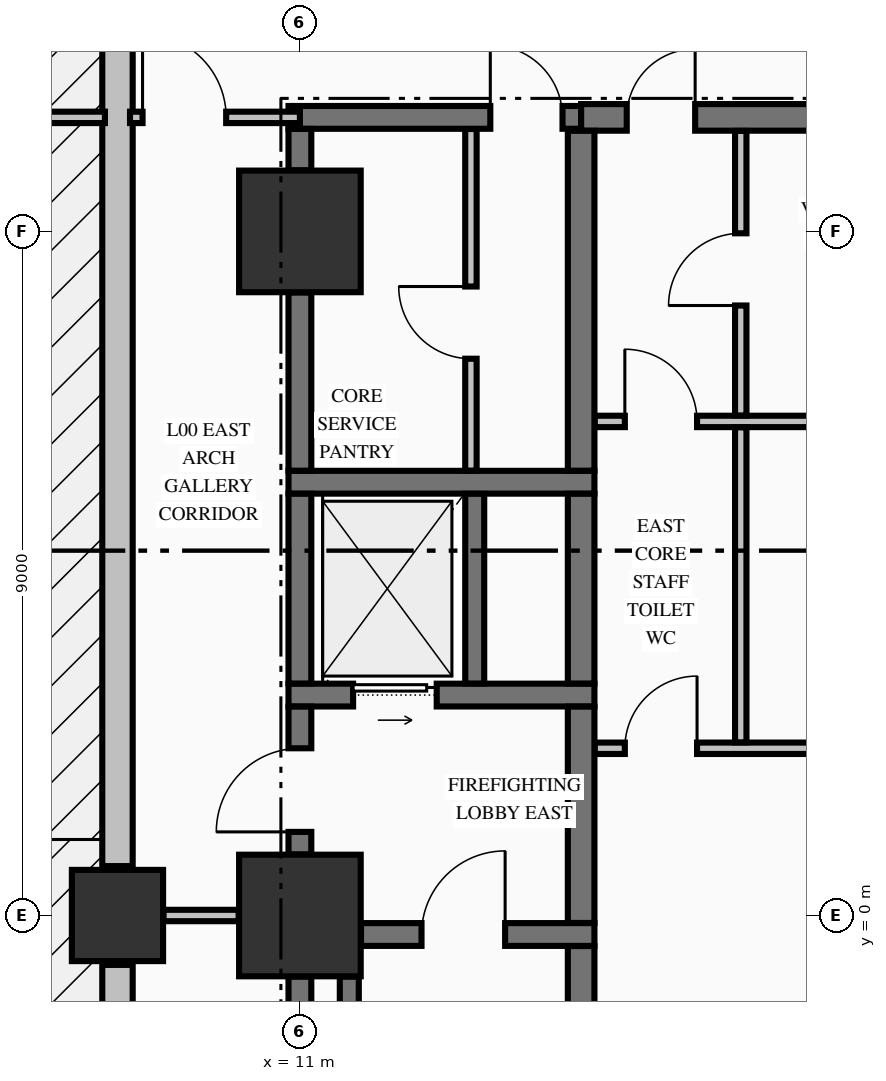
"""IFC4 building model, lengths in metres.
Left out: names, types, materials, properties, quantities, classifications, styles, units other than length and angle.
Written with IfcOpenShell. Run it as: python <this file> out.ifc"""

import sys

from ifc_helpers import new_model, si_unit, direction, frame, frame_2d, origin, origin_2d, place, context, subcontext, project, spatial, rectangle, extrude, element, fill, save


model = new_model("IFC4")
c1 = context("Model", 3, precision=1e-05, world=origin(), true_north=direction((0.0, 1.0)))
c2 = subcontext(c1, "Body", "Model", "MODEL_VIEW")
j1 = project(units=[si_unit("LENGTHUNIT", "METRE"), si_unit("PLANEANGLEUNIT", "RADIAN")], contexts=[c1])
p1 = place(None, origin())
s1 = spatial("IfcSite", under=j1, at=p1, CompositionType="ELEMENT")
p2 = place(p1, origin())
s2 = spatial("IfcBuilding", under=s1, at=p2, CompositionType="ELEMENT")
p3 = place(p2, origin())
s3 = spatial("IfcBuildingStorey", under=s2, at=p3, CompositionType="ELEMENT", Elevation=0.0)
for number, where, z_axis, x_axis in (
    (1, (11.0, 0.0, 0.0), (0.0, 0.0, 1.0), (1.0, 0.0, 0.0)),
    (2, (11.0, 9.0, 0.0), (0.0, 0.0, 1.0), (1.0, 0.0, 0.0)),
):
    element("IfcColumn", number, at=place(p3, frame(where, z_axis=z_axis, x_axis=x_axis)), inside=s3, PredefinedType="COLUMN", context=c2, shape_type="SweptSolid", body=[
        extrude(rectangle(XDim=1.6, YDim=1.6, at=origin_2d()), origin(), (0.0, 0.0, 1.0), 5.09),
    ])
p4 = place(p3, frame((8.6, 0.0, 0.0), z_axis=(0.0, 0.0, 1.0), x_axis=(1.0, 0.0, 0.0)))
e3 = element("IfcColumn", 3, at=p4, inside=s3, PredefinedType="COLUMN", context=c2, shape_type="SweptSolid", body=[
    extrude(rectangle(XDim=1.2, YDim=1.2, at=origin_2d()), origin(), (0.0, 0.0, 1.0), 5.09),
])
p5 = place(p3, frame((8.6, 15.35, 0.0), z_axis=(0.0, 0.0, 1.0), x_axis=(0.0, -1.0, 0.0)))
e4 = element("IfcWall", 4, at=p5, inside=s3, PredefinedType="STANDARD", context=c2, shape_type="SweptSolid", body=[
    extrude(rectangle(XDim=14.7, YDim=0.4, at=frame_2d((7.35, 0.0))), origin(), (0.0, 0.0, 1.0), 4.132),
])
p6 = place(p3, frame((8.6, -0.65, 0.0), z_axis=(0.0, 0.0, 1.0), x_axis=(0.0, -1.0, 0.0)))
e5 = element("IfcWall", 5, at=p6, inside=s3, PredefinedType="STANDARD", context=c2, shape_type="SweptSolid", body=[
    extrude(rectangle(XDim=24.7, YDim=0.4, at=frame_2d((12.35, 0.0))), origin(), (0.0, 0.0, 1.0), 4.132),
])
p7 = place(p6, frame((10.5, 0.0, 0.0)))
e6 = element("IfcOpeningElement", 6, at=p7, cuts=e5, PredefinedType="OPENING", context=c2, shape_type="SweptSolid", body=[
    extrude(rectangle(XDim=2.4, YDim=2.6, at=frame_2d((1.2, 1.3))), frame((0.0, 0.21, 0.0), z_axis=(0.0, -1.0, 0.0), x_axis=(1.0, 0.0, 0.0)), (0.0, 0.0, 1.0), 0.42),
])
p8 = place(p3, frame((11.804, -0.25, 0.0), z_axis=(0.0, 0.0, 1.0), x_axis=(1.0, 0.0, 0.0)))
e7 = element("IfcWall", 7, at=p8, inside=s3, PredefinedType="SHEAR", context=c2, shape_type="SweptSolid", body=[
    extrude(rectangle(XDim=3.071, YDim=0.3, at=frame_2d((1.536, 0.0))), origin(), (0.0, 0.0, 1.0), 5.09),
])
p9 = place(p8, frame((0.796, 0.0, 0.0)))
e8 = element("IfcOpeningElement", 8, at=p9, cuts=e7, PredefinedType="OPENING", context=c2, shape_type="SweptSolid", body=[
    extrude(rectangle(XDim=1.1, YDim=2.15, at=frame_2d((0.55, 1.075))), frame((0.0, 0.16, 0.0), z_axis=(0.0, -1.0, 0.0), x_axis=(1.0, 0.0, 0.0)), (0.0, 0.0, 1.0), 0.32),
])
p10 = place(p3, frame((10.85, 2.9, 0.0), z_axis=(0.0, 0.0, 1.0), x_axis=(1.0, 0.0, 0.0)))
e9 = element("IfcWall", 9, at=p10, inside=s3, PredefinedType="SHEAR", context=c2, shape_type="SweptSolid", body=[
    extrude(rectangle(XDim=4.025, YDim=0.3, at=frame_2d((2.012, 0.0))), origin(), (0.0, 0.0, 1.0), 5.09),
])
p11 = place(p10, frame((0.85, 0.0, 0.0)))
e10 = element("IfcOpeningElement", 10, at=p11, cuts=e9, PredefinedType="OPENING", context=c2, shape_type="SweptSolid", body=[
    extrude(rectangle(XDim=1.1, YDim=2.2, at=frame_2d((0.55, 1.1))), frame((0.0, 0.16, 0.0), z_axis=(0.0, -1.0, 0.0), x_axis=(1.0, 0.0, 0.0)), (0.0, 0.0, 1.0), 0.32),
])
p12 = place(p3, frame((10.85, 5.7, 0.0), z_axis=(0.0, 0.0, 1.0), x_axis=(1.0, 0.0, 0.0)))
e11 = element("IfcWall", 11, at=p12, inside=s3, PredefinedType="SHEAR", context=c2, shape_type="SweptSolid", body=[
    extrude(rectangle(XDim=4.025, YDim=0.3, at=frame_2d((2.012, 0.0))), origin(), (0.0, 0.0, 1.0), 5.09),
])
p13 = place(p3, frame((10.85, 10.5, 0.0), z_axis=(0.0, 0.0, 1.0), x_axis=(1.0, 0.0, 0.0)))
e12 = element("IfcWall", 12, at=p13, inside=s3, PredefinedType="SHEAR", context=c2, shape_type="SweptSolid", body=[
    extrude(rectangle(XDim=3.85, YDim=0.3, at=frame_2d((1.925, 0.0))), origin(), (0.0, 0.0, 1.0), 5.09),
])
p14 = place(p13, frame((2.655, 0.0, 0.0)))
e13 = element("IfcOpeningElement", 13, at=p14, cuts=e12, PredefinedType="OPENING", context=c2, shape_type="SweptSolid", body=[
    extrude(rectangle(XDim=0.95, YDim=2.15, at=frame_2d((0.475, 1.075))), frame((0.0, 0.16, 0.0), z_axis=(0.0, -1.0, 0.0), x_axis=(1.0, 0.0, 0.0)), (0.0, 0.0, 1.0), 0.32),
])
p15 = place(p3, frame((14.7, 10.5, 0.0), z_axis=(0.0, 0.0, 1.0), x_axis=(1.0, 0.0, 0.0)))
e14 = element("IfcWall", 14, at=p15, inside=s3, PredefinedType="SHEAR", context=c2, shape_type="SweptSolid", body=[
    extrude(rectangle(XDim=5.475, YDim=0.35, at=frame_2d((2.738, 0.0))), origin(), (0.0, 0.0, 1.0), 5.09),
])
p16 = place(p15, frame((0.6, 0.0, 0.0)))
e15 = element("IfcOpeningElement", 15, at=p16, cuts=e14, PredefinedType="OPENING", context=c2, shape_type="SweptSolid", body=[
    extrude(rectangle(XDim=0.9, YDim=2.15, at=frame_2d((0.45, 1.075))), frame((0.0, 0.185, 0.0), z_axis=(0.0, -1.0, 0.0), x_axis=(1.0, 0.0, 0.0)), (0.0, 0.0, 1.0), 0.37),
])
p17 = place(p3, frame((9.206, 0.0, 0.0), z_axis=(0.0, 0.0, 1.0), x_axis=(1.0, 0.0, 0.0)))
e16 = element("IfcWall", 16, at=p17, inside=s3, PredefinedType="PARTITIONING", context=c2, shape_type="SweptSolid", body=[
    extrude(rectangle(XDim=0.988, YDim=0.15, at=frame_2d((0.494, 0.0))), origin(), (0.0, 0.0, 1.0), 4.132),
])
p18 = place(p3, frame((14.878, 2.2, 0.0), z_axis=(0.0, 0.0, 1.0), x_axis=(1.0, 0.0, 0.0)))
e17 = element("IfcWall", 17, at=p18, inside=s3, PredefinedType="PARTITIONING", context=c2, shape_type="SweptSolid", body=[
    extrude(rectangle(XDim=4.944, YDim=0.15, at=frame_2d((2.472, 0.0))), origin(), (0.0, 0.0, 1.0), 5.09),
])
p19 = place(p18, frame((0.397, 0.0, 0.0)))
e18 = element("IfcOpeningElement", 18, at=p19, cuts=e17, PredefinedType="OPENING", context=c2, shape_type="SweptSolid", body=[
    extrude(rectangle(XDim=0.95, YDim=2.15, at=frame_2d((0.475, 1.075))), frame((0.0, 0.085, 0.0), z_axis=(0.0, -1.0, 0.0), x_axis=(1.0, 0.0, 0.0)), (0.0, 0.0, 1.0), 0.17),
])
p20 = place(p3, frame((14.878, 6.5, 0.0), z_axis=(0.0, 0.0, 1.0), x_axis=(1.0, 0.0, 0.0)))
e19 = element("IfcWall", 19, at=p20, inside=s3, PredefinedType="PARTITIONING", context=c2, shape_type="SweptSolid", body=[
    extrude(rectangle(XDim=4.944, YDim=0.15, at=frame_2d((2.472, 0.0))), origin(), (0.0, 0.0, 1.0), 5.09),
])
p21 = place(p20, frame((0.397, 0.0, 0.0)))
e20 = element("IfcOpeningElement", 20, at=p21, cuts=e19, PredefinedType="OPENING", context=c2, shape_type="SweptSolid", body=[
    extrude(rectangle(XDim=0.95, YDim=2.15, at=frame_2d((0.475, 1.075))), frame((0.0, 0.085, 0.0), z_axis=(0.0, -1.0, 0.0), x_axis=(1.0, 0.0, 0.0)), (0.0, 0.0, 1.0), 0.17),
])
p22 = place(p20, frame((3.047, 0.0, 0.0)))
e21 = element("IfcOpeningElement", 21, at=p22, cuts=e19, PredefinedType="OPENING", context=c2, shape_type="SweptSolid", body=[
    extrude(rectangle(XDim=0.95, YDim=2.15, at=frame_2d((0.475, 1.075))), frame((0.0, 0.085, 0.0), z_axis=(0.0, -1.0, 0.0), x_axis=(1.0, 0.0, 0.0)), (0.0, 0.0, 1.0), 0.17),
])
p23 = place(p3, frame((-8.435, 10.5, 0.0), z_axis=(0.0, 0.0, 1.0), x_axis=(1.0, 0.0, 0.0)))
e22 = element("IfcWall", 22, at=p23, inside=s3, PredefinedType="PARTITIONING", context=c2, shape_type="SweptSolid", body=[
    extrude(rectangle(XDim=16.87, YDim=0.15, at=frame_2d((8.435, 0.0))), origin(), (0.0, 0.0, 1.0), 5.09),
])
p24 = place(p23, frame((7.735, 0.0, 0.0)))
e23 = element("IfcOpeningElement", 23, at=p24, cuts=e22, PredefinedType="OPENING", context=c2, shape_type="SweptSolid", body=[
    extrude(rectangle(XDim=1.4, YDim=2.2, at=frame_2d((0.7, 1.1))), frame((0.0, 0.085, 0.0), z_axis=(0.0, -1.0, 0.0), x_axis=(1.0, 0.0, 0.0)), (0.0, 0.0, 1.0), 0.17),
])
p25 = place(p3, frame((8.765, 10.5, 0.0), z_axis=(0.0, 0.0, 1.0), x_axis=(1.0, 0.0, 0.0)))
e24 = element("IfcWall", 24, at=p25, inside=s3, PredefinedType="PARTITIONING", context=c2, shape_type="SweptSolid", body=[
    extrude(rectangle(XDim=2.235, YDim=0.15, at=frame_2d((1.118, 0.0))), origin(), (0.0, 0.0, 1.0), 5.09),
])
p26 = place(p25, frame((0.165, 0.0, 0.0)))
e25 = element("IfcOpeningElement", 25, at=p26, cuts=e24, PredefinedType="OPENING", context=c2, shape_type="SweptSolid", body=[
    extrude(rectangle(XDim=1.1, YDim=2.15, at=frame_2d((0.55, 1.075))), frame((0.0, 0.085, 0.0), z_axis=(0.0, -1.0, 0.0), x_axis=(1.0, 0.0, 0.0)), (0.0, 0.0, 1.0), 0.17),
])
p27 = place(p3, frame((11.0, -8.196, 0.0), z_axis=(0.0, 0.0, 1.0), x_axis=(0.0, 1.0, 0.0)))
e26 = element("IfcWall", 26, at=p27, inside=s3, PredefinedType="SHEAR", context=c2, shape_type="SweptSolid", body=[
    extrude(rectangle(XDim=7.392, YDim=0.3, at=frame_2d((3.696, 0.0))), origin(), (0.0, 0.0, 1.0), 5.09),
])
p28 = place(p3, frame((11.0, 0.804, 0.0), z_axis=(0.0, 0.0, 1.0), x_axis=(0.0, 1.0, 0.0)))
e27 = element("IfcWall", 27, at=p28, inside=s3, PredefinedType="SHEAR", context=c2, shape_type="SweptSolid", body=[
    extrude(rectangle(XDim=1.944, YDim=0.3, at=frame_2d((0.972, 0.0))), origin(), (0.0, 0.0, 1.0), 5.09),
])
p29 = place(p28, frame((0.296, 0.0, 0.0)))
e28 = element("IfcOpeningElement", 28, at=p29, cuts=e27, PredefinedType="OPENING", context=c2, shape_type="SweptSolid", body=[
    extrude(rectangle(XDim=1.1, YDim=2.15, at=frame_2d((0.55, 1.075))), frame((0.0, 0.16, 0.0), z_axis=(0.0, -1.0, 0.0), x_axis=(1.0, 0.0, 0.0)), (0.0, 0.0, 1.0), 0.32),
])
p30 = place(p3, frame((11.0, 3.052, 0.0), z_axis=(0.0, 0.0, 1.0), x_axis=(0.0, 1.0, 0.0)))
e29 = element("IfcWall", 29, at=p30, inside=s3, PredefinedType="SHEAR", context=c2, shape_type="SweptSolid", body=[
    extrude(rectangle(XDim=2.496, YDim=0.3, at=frame_2d((1.248, 0.0))), origin(), (0.0, 0.0, 1.0), 5.09),
])
p31 = place(p3, frame((11.0, 5.852, 0.0), z_axis=(0.0, 0.0, 1.0), x_axis=(0.0, 1.0, 0.0)))
e30 = element("IfcWall", 30, at=p31, inside=s3, PredefinedType="SHEAR", context=c2, shape_type="SweptSolid", body=[
    extrude(rectangle(XDim=2.344, YDim=0.3, at=frame_2d((1.172, 0.0))), origin(), (0.0, 0.0, 1.0), 5.09),
])
p32 = place(p3, frame((11.0, 9.804, 0.0), z_axis=(0.0, 0.0, 1.0), x_axis=(0.0, 1.0, 0.0)))
e31 = element("IfcWall", 31, at=p32, inside=s3, PredefinedType="SHEAR", context=c2, shape_type="SweptSolid", body=[
    extrude(rectangle(XDim=0.544, YDim=0.3, at=frame_2d((0.272, 0.0))), origin(), (0.0, 0.0, 1.0), 5.09),
])
p33 = place(p3, frame((11.65, -8.196, 0.0), z_axis=(0.0, 0.0, 1.0), x_axis=(0.0, 1.0, 0.0)))
e32 = element("IfcWall", 32, at=p33, inside=s3, PredefinedType="SOLIDWALL", context=c2, shape_type="SweptSolid", body=[
    extrude(rectangle(XDim=7.392, YDim=0.25, at=frame_2d((3.696, 0.0))), origin(), (0.0, 0.0, 1.0), 5.09),
])
p34 = place(p3, frame((13.3, 3.052, 0.0), z_axis=(0.0, 0.0, 1.0), x_axis=(0.0, 1.0, 0.0)))
e33 = element("IfcWall", 33, at=p34, inside=s3, PredefinedType="SOLIDWALL", context=c2, shape_type="SweptSolid", body=[
    extrude(rectangle(XDim=2.496, YDim=0.25, at=frame_2d((1.248, 0.0))), origin(), (0.0, 0.0, 1.0), 5.09),
])
p35 = place(p3, frame((14.7, -9.773, 0.0), z_axis=(0.0, 0.0, 1.0), x_axis=(0.0, 1.0, 0.0)))
e34 = element("IfcWall", 34, at=p35, inside=s3, PredefinedType="SHEAR", context=c2, shape_type="SweptSolid", body=[
    extrude(rectangle(XDim=9.371, YDim=0.35, at=frame_2d((4.686, 0.0))), origin(), (0.0, 0.0, 1.0), 5.09),
])
p36 = place(p3, frame((14.7, -0.098, 0.0), z_axis=(0.0, 0.0, 1.0), x_axis=(0.0, 1.0, 0.0)))
e35 = element("IfcWall", 35, at=p36, inside=s3, PredefinedType="SHEAR", context=c2, shape_type="SweptSolid", body=[
    extrude(rectangle(XDim=2.846, YDim=0.35, at=frame_2d((1.423, 0.0))), origin(), (0.0, 0.0, 1.0), 5.09),
])
p37 = place(p3, frame((14.7, 3.052, 0.0), z_axis=(0.0, 0.0, 1.0), x_axis=(0.0, 1.0, 0.0)))
e36 = element("IfcWall", 36, at=p37, inside=s3, PredefinedType="SHEAR", context=c2, shape_type="SweptSolid", body=[
    extrude(rectangle(XDim=2.496, YDim=0.35, at=frame_2d((1.248, 0.0))), origin(), (0.0, 0.0, 1.0), 5.09),
])
p38 = place(p3, frame((14.7, 5.852, 0.0), z_axis=(0.0, 0.0, 1.0), x_axis=(0.0, 1.0, 0.0)))
e37 = element("IfcWall", 37, at=p38, inside=s3, PredefinedType="SHEAR", context=c2, shape_type="SweptSolid", body=[
    extrude(rectangle(XDim=4.471, YDim=0.35, at=frame_2d((2.235, 0.0))), origin(), (0.0, 0.0, 1.0), 5.09),
])
p39 = place(p3, frame((13.25, 5.853, 0.0), z_axis=(0.0, 0.0, 1.0), x_axis=(0.0, 1.0, 0.0)))
e38 = element("IfcWall", 38, at=p39, inside=s3, PredefinedType="PARTITIONING", context=c2, shape_type="SweptSolid", body=[
    extrude(rectangle(XDim=4.494, YDim=0.15, at=frame_2d((2.247, 0.0))), origin(), (0.0, 0.0, 1.0), 5.09),
])
p40 = place(p39, frame((1.472, 0.0, 0.0)))
e39 = element("IfcOpeningElement", 39, at=p40, cuts=e38, PredefinedType="OPENING", context=c2, shape_type="SweptSolid", body=[
    extrude(rectangle(XDim=0.95, YDim=2.15, at=frame_2d((0.475, 1.075))), frame((0.0, 0.085, 0.0), z_axis=(0.0, -1.0, 0.0), x_axis=(1.0, 0.0, 0.0)), (0.0, 0.0, 1.0), 0.17),
])
p41 = place(p3, frame((16.8, 2.278, 0.0), z_axis=(0.0, 0.0, 1.0), x_axis=(0.0, 1.0, 0.0)))
e40 = element("IfcWall", 40, at=p41, inside=s3, PredefinedType="PARTITIONING", context=c2, shape_type="SweptSolid", body=[
    extrude(rectangle(XDim=4.144, YDim=0.15, at=frame_2d((2.072, 0.0))), origin(), (0.0, 0.0, 1.0), 5.09),
])
p42 = place(p3, frame((16.8, 6.578, 0.0), z_axis=(0.0, 0.0, 1.0), x_axis=(0.0, 1.0, 0.0)))
e41 = element("IfcWall", 41, at=p42, inside=s3, PredefinedType="PARTITIONING", context=c2, shape_type="SweptSolid", body=[
    extrude(rectangle(XDim=3.744, YDim=0.15, at=frame_2d((1.872, 0.0))), origin(), (0.0, 0.0, 1.0), 5.09),
])
p43 = place(p42, frame((1.447, 0.0, 0.0)))
e42 = element("IfcOpeningElement", 42, at=p43, cuts=e41, PredefinedType="OPENING", context=c2, shape_type="SweptSolid", body=[
    extrude(rectangle(XDim=0.95, YDim=2.15, at=frame_2d((0.475, 1.075))), frame((0.0, 0.085, 0.0), z_axis=(0.0, -1.0, 0.0), x_axis=(1.0, 0.0, 0.0)), (0.0, 0.0, 1.0), 0.17),
])
p44 = place(p9, origin())
e43 = element("IfcDoor", 43, at=p44, inside=s3, OperationType="SINGLE_SWING_RIGHT", PredefinedType="DOOR", context=c2, shape_type="SweptSolid", body=[
    extrude(rectangle(XDim=1.1, YDim=2.15, at=frame_2d((0.55, 1.075))), frame((0.0, 0.025, 0.0), z_axis=(0.0, -1.0, 0.0), x_axis=(1.0, 0.0, 0.0)), (0.0, 0.0, 1.0), 0.05),
])
fill(e8, e43)
p45 = place(p29, origin())
e44 = element("IfcDoor", 44, at=p45, inside=s3, OperationType="SINGLE_SWING_LEFT", PredefinedType="DOOR", context=c2, shape_type="SweptSolid", body=[
    extrude(rectangle(XDim=1.1, YDim=2.15, at=frame_2d((0.55, 1.075))), frame((0.0, 0.025, 0.0), z_axis=(0.0, -1.0, 0.0), x_axis=(1.0, 0.0, 0.0)), (0.0, 0.0, 1.0), 0.05),
])
fill(e28, e44)
p46 = place(p11, origin())
e45 = element("IfcDoor", 45, at=p46, inside=s3, OperationType="SLIDING_TO_RIGHT", PredefinedType="DOOR", context=c2, shape_type="SweptSolid", body=[
    extrude(rectangle(XDim=1.1, YDim=2.2, at=frame_2d((0.55, 1.1))), frame((0.0, 0.025, 0.0), z_axis=(0.0, -1.0, 0.0), x_axis=(1.0, 0.0, 0.0)), (0.0, 0.0, 1.0), 0.05),
])
fill(e10, e45)
p47 = place(p14, origin())
e46 = element("IfcDoor", 46, at=p47, inside=s3, OperationType="SINGLE_SWING_LEFT", PredefinedType="DOOR", context=c2, shape_type="SweptSolid", body=[
    extrude(rectangle(XDim=0.95, YDim=2.15, at=frame_2d((0.475, 1.075))), frame((0.0, 0.025, 0.0), z_axis=(0.0, -1.0, 0.0), x_axis=(1.0, 0.0, 0.0)), (0.0, 0.0, 1.0), 0.05),
])
fill(e13, e46)
p48 = place(p40, origin())
e47 = element("IfcDoor", 47, at=p48, inside=s3, OperationType="SINGLE_SWING_RIGHT", PredefinedType="DOOR", context=c2, shape_type="SweptSolid", body=[
    extrude(rectangle(XDim=0.95, YDim=2.15, at=frame_2d((0.475, 1.075))), frame((0.0, 0.025, 0.0), z_axis=(0.0, -1.0, 0.0), x_axis=(1.0, 0.0, 0.0)), (0.0, 0.0, 1.0), 0.05),
])
fill(e39, e47)
p49 = place(p16, origin())
e48 = element("IfcDoor", 48, at=p49, inside=s3, OperationType="SINGLE_SWING_RIGHT", PredefinedType="DOOR", context=c2, shape_type="SweptSolid", body=[
    extrude(rectangle(XDim=0.9, YDim=2.15, at=frame_2d((0.45, 1.075))), frame((0.0, 0.025, 0.0), z_axis=(0.0, -1.0, 0.0), x_axis=(1.0, 0.0, 0.0)), (0.0, 0.0, 1.0), 0.05),
])
fill(e15, e48)
p50 = place(p21, origin())
e49 = element("IfcDoor", 49, at=p50, inside=s3, OperationType="SINGLE_SWING_LEFT", PredefinedType="DOOR", context=c2, shape_type="SweptSolid", body=[
    extrude(rectangle(XDim=0.95, YDim=2.15, at=frame_2d((0.475, 1.075))), frame((0.0, 0.025, 0.0), z_axis=(0.0, -1.0, 0.0), x_axis=(1.0, 0.0, 0.0)), (0.0, 0.0, 1.0), 0.05),
])
fill(e20, e49)
p51 = place(p19, origin())
e50 = element("IfcDoor", 50, at=p51, inside=s3, OperationType="SINGLE_SWING_RIGHT", PredefinedType="DOOR", context=c2, shape_type="SweptSolid", body=[
    extrude(rectangle(XDim=0.95, YDim=2.15, at=frame_2d((0.475, 1.075))), frame((0.0, 0.025, 0.0), z_axis=(0.0, -1.0, 0.0), x_axis=(1.0, 0.0, 0.0)), (0.0, 0.0, 1.0), 0.05),
])
fill(e18, e50)
p52 = place(p43, origin())
e51 = element("IfcDoor", 51, at=p52, inside=s3, OperationType="SINGLE_SWING_LEFT", PredefinedType="DOOR", context=c2, shape_type="SweptSolid", body=[
    extrude(rectangle(XDim=0.95, YDim=2.15, at=frame_2d((0.475, 1.075))), frame((0.0, 0.025, 0.0), z_axis=(0.0, -1.0, 0.0), x_axis=(1.0, 0.0, 0.0)), (0.0, 0.0, 1.0), 0.05),
])
fill(e42, e51)
p53 = place(p26, origin())
e52 = element("IfcDoor", 52, at=p53, inside=s3, OperationType="SINGLE_SWING_LEFT", PredefinedType="DOOR", context=c2, shape_type="SweptSolid", body=[
    extrude(rectangle(XDim=1.1, YDim=2.15, at=frame_2d((0.55, 1.075))), frame((0.0, 0.025, 0.0), z_axis=(0.0, -1.0, 0.0), x_axis=(1.0, 0.0, 0.0)), (0.0, 0.0, 1.0), 0.05),
])
fill(e25, e52)
save(model, sys.argv[1])
